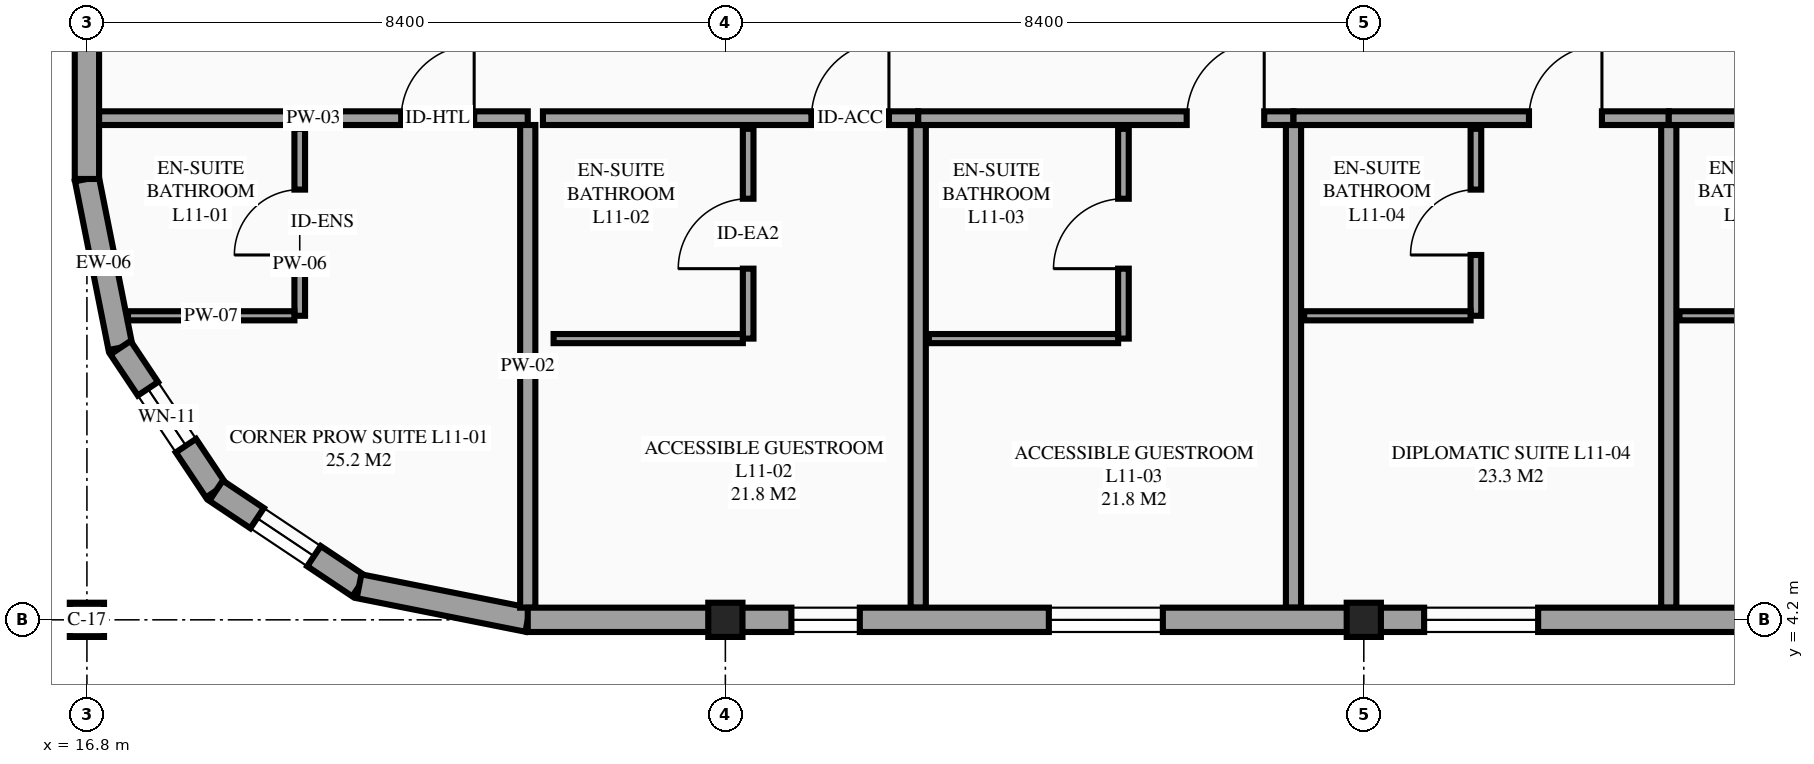
"""IFC4 building model, lengths in metres.
Left out: names, types, materials, properties, quantities, classifications, styles, units other than length and angle.
Written with IfcOpenShell. Run it as: python <this file> out.ifc"""

import sys

from ifc_helpers import new_model, si_unit, direction, frame, frame_2d, origin, origin_2d, place, context, subcontext, project, spatial, rectangle, extrude, element, fill, save


model = new_model("IFC4")
c1 = context("Model", 3, precision=1e-05, world=origin(), true_north=direction((0.0, 1.0)))
c2 = subcontext(c1, "Body", "Model", "MODEL_VIEW")
j1 = project(units=[si_unit("LENGTHUNIT", "METRE"), si_unit("PLANEANGLEUNIT", "RADIAN")], contexts=[c1])
p1 = place(None, origin())
s1 = spatial("IfcSite", under=j1, at=p1, CompositionType="ELEMENT")
p2 = place(p1, origin())
s2 = spatial("IfcBuilding", under=s1, at=p2, CompositionType="ELEMENT")
p3 = place(p2, frame((0.0, 0.0, 43.5)))
s3 = spatial("IfcBuildingStorey", under=s2, at=p3, CompositionType="ELEMENT", Elevation=43.5)
for number, where, z_axis, x_axis in (
    (1, (16.8, 4.2, 0.0), (0.0, 0.0, 1.0), (1.0, 0.0, 0.0)),
    (2, (25.2, 4.2, 0.0), (0.0, 0.0, 1.0), (1.0, 0.0, 0.0)),
    (3, (33.6, 4.2, 0.0), (0.0, 0.0, 1.0), (1.0, 0.0, 0.0)),
):
    element("IfcColumn", number, at=place(p3, frame(where, z_axis=z_axis, x_axis=x_axis)), inside=s3, PredefinedType="COLUMN", context=c2, shape_type="SweptSolid", body=[
        extrude(rectangle(XDim=0.45, YDim=0.45, at=origin_2d()), origin(), (0.0, 0.0, 1.0), 3.6),
    ])
p4 = place(p3, frame((16.8, 10.0, 0.0), z_axis=(0.0, 0.0, 1.0), x_axis=(0.195057908159, -0.980791727363, 0.0)))
e4 = element("IfcWall", 4, at=p4, inside=s3, PredefinedType="STANDARD", context=c2, shape_type="SweptSolid", body=[
    extrude(rectangle(XDim=2.263, YDim=0.32, at=frame_2d((1.131, 0.0))), origin(), (0.0, 0.0, 1.0), 2.56),
])
p5 = place(p3, frame((17.241, 7.781, 0.0), z_axis=(0.0, 0.0, 1.0), x_axis=(0.555546297918, -0.831485604728, 0.0)))
e5 = element("IfcWall", 5, at=p5, inside=s3, PredefinedType="STANDARD", context=c2, shape_type="SweptSolid", body=[
    extrude(rectangle(XDim=2.263, YDim=0.32, at=frame_2d((1.132, 0.0))), origin(), (0.0, 0.0, 1.0), 3.6),
])
p6 = place(p5, frame((0.65, 0.0, 0.75)))
e6 = element("IfcOpeningElement", 6, at=p6, cuts=e5, PredefinedType="OPENING", context=c2, shape_type="SweptSolid", body=[
    extrude(rectangle(XDim=0.9, YDim=1.55, at=frame_2d((0.45, 0.775))), frame((0.0, 0.17, 0.0), z_axis=(0.0, -1.0, 0.0), x_axis=(1.0, 0.0, 0.0)), (0.0, 0.0, 1.0), 0.34),
])
p7 = place(p3, frame((18.499, 5.899, 0.0), z_axis=(0.0, 0.0, 1.0), x_axis=(0.831502143458, -0.555521543618, 0.0)))
e7 = element("IfcWall", 7, at=p7, inside=s3, PredefinedType="STANDARD", context=c2, shape_type="SweptSolid", body=[
    extrude(rectangle(XDim=2.263, YDim=0.32, at=frame_2d((1.131, 0.0))), origin(), (0.0, 0.0, 1.0), 3.6),
])
p8 = place(p7, frame((0.65, 0.0, 0.75)))
e8 = element("IfcOpeningElement", 8, at=p8, cuts=e7, PredefinedType="OPENING", context=c2, shape_type="SweptSolid", body=[
    extrude(rectangle(XDim=0.9, YDim=1.55, at=frame_2d((0.45, 0.775))), frame((0.0, 0.17, 0.0), z_axis=(0.0, -1.0, 0.0), x_axis=(1.0, 0.0, 0.0)), (0.0, 0.0, 1.0), 0.34),
])
p9 = place(p3, frame((20.38, 4.642, 0.0), z_axis=(0.0, 0.0, 1.0), x_axis=(0.98077519094, -0.195141038321, 0.0)))
e9 = element("IfcWall", 9, at=p9, inside=s3, PredefinedType="STANDARD", context=c2, shape_type="SweptSolid", body=[
    extrude(rectangle(XDim=2.263, YDim=0.32, at=frame_2d((1.132, 0.0))), origin(), (0.0, 0.0, 1.0), 2.41),
])
p10 = place(p3, frame((16.8, 21.0, 0.0), z_axis=(0.0, 0.0, 1.0), x_axis=(0.0, -1.0, 0.0)))
e10 = element("IfcWall", 10, at=p10, inside=s3, PredefinedType="STANDARD", context=c2, shape_type="SweptSolid", body=[
    extrude(rectangle(XDim=11.0, YDim=0.32, at=frame_2d((5.5, 0.0))), origin(), (0.0, 0.0, 1.0), 2.51),
])
p11 = place(p3, frame((16.96, 10.8, 0.0), z_axis=(0.0, 0.0, 1.0), x_axis=(1.0, 0.0, 0.0)))
e11 = element("IfcWall", 11, at=p11, inside=s3, PredefinedType="PARTITIONING", context=c2, shape_type="SweptSolid", body=[
    extrude(rectangle(XDim=5.64, YDim=0.18, at=frame_2d((2.82, 0.0))), origin(), (0.0, 0.0, 1.0), 3.355),
])
p12 = place(p11, frame((3.975, 0.0, 0.0)))
e12 = element("IfcOpeningElement", 12, at=p12, cuts=e11, PredefinedType="OPENING", context=c2, shape_type="SweptSolid", body=[
    extrude(rectangle(XDim=0.96, YDim=2.15, at=frame_2d((0.48, 1.075))), frame((0.0, 0.1, 0.0), z_axis=(0.0, -1.0, 0.0), x_axis=(1.0, 0.0, 0.0)), (0.0, 0.0, 1.0), 0.2),
])
p13 = place(p3, frame((22.6, 4.36, 0.0), z_axis=(0.0, 0.0, 1.0), x_axis=(0.0, 1.0, 0.0)))
e13 = element("IfcWall", 13, at=p13, inside=s3, PredefinedType="PARTITIONING", context=c2, shape_type="SweptSolid", body=[
    extrude(rectangle(XDim=6.35, YDim=0.2, at=frame_2d((3.175, 0.0))), origin(), (0.0, 0.0, 1.0), 3.355),
])
p14 = place(p3, frame((19.6, 8.2, 0.0), z_axis=(0.0, 0.0, 1.0), x_axis=(0.0, 1.0, 0.0)))
e14 = element("IfcWall", 14, at=p14, inside=s3, PredefinedType="PARTITIONING", context=c2, shape_type="SweptSolid", body=[
    extrude(rectangle(XDim=2.46, YDim=0.14, at=frame_2d((1.23, 0.0))), origin(), (0.0, 0.0, 1.0), 3.355),
])
p15 = place(p14, frame((0.8, 0.0, 0.0)))
e15 = element("IfcOpeningElement", 15, at=p15, cuts=e14, PredefinedType="OPENING", context=c2, shape_type="SweptSolid", body=[
    extrude(rectangle(XDim=0.86, YDim=2.1, at=frame_2d((0.43, 1.05))), frame((0.0, 0.08, 0.0), z_axis=(0.0, -1.0, 0.0), x_axis=(1.0, 0.0, 0.0)), (0.0, 0.0, 1.0), 0.16),
])
p16 = place(p3, frame((17.34, 8.2, 0.0), z_axis=(0.0, 0.0, 1.0), x_axis=(1.0, 0.0, 0.0)))
e16 = element("IfcWall", 16, at=p16, inside=s3, PredefinedType="PARTITIONING", context=c2, shape_type="SweptSolid", body=[
    extrude(rectangle(XDim=2.19, YDim=0.12, at=frame_2d((1.095, 0.0))), origin(), (0.0, 0.0, 1.0), 3.355),
])
p17 = place(p3, frame((22.8, 10.8, 0.0), z_axis=(0.0, 0.0, 1.0), x_axis=(1.0, 0.0, 0.0)))
e17 = element("IfcWall", 17, at=p17, inside=s3, PredefinedType="PARTITIONING", context=c2, shape_type="SweptSolid", body=[
    extrude(rectangle(XDim=4.938, YDim=0.18, at=frame_2d((2.469, 0.0))), origin(), (0.0, 0.0, 1.0), 3.355),
])
p18 = place(p17, frame((3.532, 0.0, 0.0)))
e18 = element("IfcOpeningElement", 18, at=p18, cuts=e17, PredefinedType="OPENING", context=c2, shape_type="SweptSolid", body=[
    extrude(rectangle(XDim=1.02, YDim=2.15, at=frame_2d((0.51, 1.075))), frame((0.0, 0.1, 0.0), z_axis=(0.0, -1.0, 0.0), x_axis=(1.0, 0.0, 0.0)), (0.0, 0.0, 1.0), 0.2),
])
p19 = place(p3, frame((27.738, 4.36, 0.0), z_axis=(0.0, 0.0, 1.0), x_axis=(0.0, 1.0, 0.0)))
e19 = element("IfcWall", 19, at=p19, inside=s3, PredefinedType="PARTITIONING", context=c2, shape_type="SweptSolid", body=[
    extrude(rectangle(XDim=6.35, YDim=0.2, at=frame_2d((3.175, 0.0))), origin(), (0.0, 0.0, 1.0), 3.355),
])
p20 = place(p3, frame((25.5, 7.9, 0.0), z_axis=(0.0, 0.0, 1.0), x_axis=(0.0, 1.0, 0.0)))
e20 = element("IfcWall", 20, at=p20, inside=s3, PredefinedType="PARTITIONING", context=c2, shape_type="SweptSolid", body=[
    extrude(rectangle(XDim=2.76, YDim=0.14, at=frame_2d((1.38, 0.0))), origin(), (0.0, 0.0, 1.0), 3.355),
])
p21 = place(p20, frame((0.92, 0.0, 0.0)))
e21 = element("IfcOpeningElement", 21, at=p21, cuts=e20, PredefinedType="OPENING", context=c2, shape_type="SweptSolid", body=[
    extrude(rectangle(XDim=0.92, YDim=2.1, at=frame_2d((0.46, 1.05))), frame((0.0, 0.08, 0.0), z_axis=(0.0, -1.0, 0.0), x_axis=(1.0, 0.0, 0.0)), (0.0, 0.0, 1.0), 0.16),
])
p22 = place(p3, frame((22.94, 7.9, 0.0), z_axis=(0.0, 0.0, 1.0), x_axis=(1.0, 0.0, 0.0)))
e22 = element("IfcWall", 22, at=p22, inside=s3, PredefinedType="PARTITIONING", context=c2, shape_type="SweptSolid", body=[
    extrude(rectangle(XDim=2.49, YDim=0.12, at=frame_2d((1.245, 0.0))), origin(), (0.0, 0.0, 1.0), 3.355),
])
p23 = place(p3, frame((27.738, 10.8, 0.0), z_axis=(0.0, 0.0, 1.0), x_axis=(1.0, 0.0, 0.0)))
e23 = element("IfcWall", 23, at=p23, inside=s3, PredefinedType="PARTITIONING", context=c2, shape_type="SweptSolid", body=[
    extrude(rectangle(XDim=4.938, YDim=0.18, at=frame_2d((2.469, 0.0))), origin(), (0.0, 0.0, 1.0), 3.355),
])
p24 = place(p23, frame((3.532, 0.0, 0.0)))
e24 = element("IfcOpeningElement", 24, at=p24, cuts=e23, PredefinedType="OPENING", context=c2, shape_type="SweptSolid", body=[
    extrude(rectangle(XDim=1.02, YDim=2.15, at=frame_2d((0.51, 1.075))), frame((0.0, 0.1, 0.0), z_axis=(0.0, -1.0, 0.0), x_axis=(1.0, 0.0, 0.0)), (0.0, 0.0, 1.0), 0.2),
])
p25 = place(p3, frame((32.675, 4.36, 0.0), z_axis=(0.0, 0.0, 1.0), x_axis=(0.0, 1.0, 0.0)))
e25 = element("IfcWall", 25, at=p25, inside=s3, PredefinedType="PARTITIONING", context=c2, shape_type="SweptSolid", body=[
    extrude(rectangle(XDim=6.35, YDim=0.2, at=frame_2d((3.175, 0.0))), origin(), (0.0, 0.0, 1.0), 3.355),
])
p26 = place(p3, frame((30.438, 7.9, 0.0), z_axis=(0.0, 0.0, 1.0), x_axis=(0.0, 1.0, 0.0)))
e26 = element("IfcWall", 26, at=p26, inside=s3, PredefinedType="PARTITIONING", context=c2, shape_type="SweptSolid", body=[
    extrude(rectangle(XDim=2.76, YDim=0.14, at=frame_2d((1.38, 0.0))), origin(), (0.0, 0.0, 1.0), 3.355),
])
p27 = place(p26, frame((0.92, 0.0, 0.0)))
e27 = element("IfcOpeningElement", 27, at=p27, cuts=e26, PredefinedType="OPENING", context=c2, shape_type="SweptSolid", body=[
    extrude(rectangle(XDim=0.92, YDim=2.1, at=frame_2d((0.46, 1.05))), frame((0.0, 0.08, 0.0), z_axis=(0.0, -1.0, 0.0), x_axis=(1.0, 0.0, 0.0)), (0.0, 0.0, 1.0), 0.16),
])
p28 = place(p3, frame((27.877, 7.9, 0.0), z_axis=(0.0, 0.0, 1.0), x_axis=(1.0, 0.0, 0.0)))
e28 = element("IfcWall", 28, at=p28, inside=s3, PredefinedType="PARTITIONING", context=c2, shape_type="SweptSolid", body=[
    extrude(rectangle(XDim=2.49, YDim=0.12, at=frame_2d((1.245, 0.0))), origin(), (0.0, 0.0, 1.0), 3.355),
])
p29 = place(p3, frame((32.675, 10.8, 0.0), z_axis=(0.0, 0.0, 1.0), x_axis=(1.0, 0.0, 0.0)))
e29 = element("IfcWall", 29, at=p29, inside=s3, PredefinedType="PARTITIONING", context=c2, shape_type="SweptSolid", body=[
    extrude(rectangle(XDim=4.938, YDim=0.18, at=frame_2d((2.469, 0.0))), origin(), (0.0, 0.0, 1.0), 3.355),
])
p30 = place(p29, frame((3.098, 0.0, 0.0)))
e30 = element("IfcOpeningElement", 30, at=p30, cuts=e29, PredefinedType="OPENING", context=c2, shape_type="SweptSolid", body=[
    extrude(rectangle(XDim=0.96, YDim=2.15, at=frame_2d((0.48, 1.075))), frame((0.0, 0.1, 0.0), z_axis=(0.0, -1.0, 0.0), x_axis=(1.0, 0.0, 0.0)), (0.0, 0.0, 1.0), 0.2),
])
p31 = place(p3, frame((37.613, 4.36, 0.0), z_axis=(0.0, 0.0, 1.0), x_axis=(0.0, 1.0, 0.0)))
e31 = element("IfcWall", 31, at=p31, inside=s3, PredefinedType="PARTITIONING", context=c2, shape_type="SweptSolid", body=[
    extrude(rectangle(XDim=6.35, YDim=0.2, at=frame_2d((3.175, 0.0))), origin(), (0.0, 0.0, 1.0), 3.355),
])
p32 = place(p3, frame((35.075, 8.2, 0.0), z_axis=(0.0, 0.0, 1.0), x_axis=(0.0, 1.0, 0.0)))
e32 = element("IfcWall", 32, at=p32, inside=s3, PredefinedType="PARTITIONING", context=c2, shape_type="SweptSolid", body=[
    extrude(rectangle(XDim=2.46, YDim=0.14, at=frame_2d((1.23, 0.0))), origin(), (0.0, 0.0, 1.0), 3.355),
])
p33 = place(p32, frame((0.8, 0.0, 0.0)))
e33 = element("IfcOpeningElement", 33, at=p33, cuts=e32, PredefinedType="OPENING", context=c2, shape_type="SweptSolid", body=[
    extrude(rectangle(XDim=0.86, YDim=2.1, at=frame_2d((0.43, 1.05))), frame((0.0, 0.08, 0.0), z_axis=(0.0, -1.0, 0.0), x_axis=(1.0, 0.0, 0.0)), (0.0, 0.0, 1.0), 0.16),
])
p34 = place(p3, frame((32.815, 8.2, 0.0), z_axis=(0.0, 0.0, 1.0), x_axis=(1.0, 0.0, 0.0)))
e34 = element("IfcWall", 34, at=p34, inside=s3, PredefinedType="PARTITIONING", context=c2, shape_type="SweptSolid", body=[
    extrude(rectangle(XDim=2.19, YDim=0.12, at=frame_2d((1.095, 0.0))), origin(), (0.0, 0.0, 1.0), 3.355),
])
p35 = place(p3, frame((37.613, 10.8, 0.0), z_axis=(0.0, 0.0, 1.0), x_axis=(1.0, 0.0, 0.0)))
e35 = element("IfcWall", 35, at=p35, inside=s3, PredefinedType="PARTITIONING", context=c2, shape_type="SweptSolid", body=[
    extrude(rectangle(XDim=4.938, YDim=0.18, at=frame_2d((2.469, 0.0))), origin(), (0.0, 0.0, 1.0), 3.355),
])
p36 = place(p35, frame((2.748, 0.0, 0.0)))
e36 = element("IfcOpeningElement", 36, at=p36, cuts=e35, PredefinedType="OPENING", context=c2, shape_type="SweptSolid", body=[
    extrude(rectangle(XDim=0.96, YDim=2.15, at=frame_2d((0.48, 1.075))), frame((0.0, 0.1, 0.0), z_axis=(0.0, -1.0, 0.0), x_axis=(1.0, 0.0, 0.0)), (0.0, 0.0, 1.0), 0.2),
])
p37 = place(p3, frame((37.752, 8.2, 0.0), z_axis=(0.0, 0.0, 1.0), x_axis=(1.0, 0.0, 0.0)))
e37 = element("IfcWall", 37, at=p37, inside=s3, PredefinedType="PARTITIONING", context=c2, shape_type="SweptSolid", body=[
    extrude(rectangle(XDim=2.19, YDim=0.12, at=frame_2d((1.095, 0.0))), origin(), (0.0, 0.0, 1.0), 3.355),
])
p38 = place(p3, frame((22.6, 4.2, 0.0), z_axis=(0.0, 0.0, 1.0), x_axis=(1.0, 0.0, 0.0)))
e38 = element("IfcWall", 38, at=p38, inside=s3, PredefinedType="STANDARD", context=c2, shape_type="SweptSolid", body=[
    extrude(rectangle(XDim=2.6, YDim=0.32, at=frame_2d((1.3, 0.0))), origin(), (0.0, 0.0, 1.0), 2.41),
])
p39 = place(p3, frame((25.2, 4.2, 0.0), z_axis=(0.0, 0.0, 1.0), x_axis=(1.0, 0.0, 0.0)))
e39 = element("IfcWall", 39, at=p39, inside=s3, PredefinedType="STANDARD", context=c2, shape_type="SweptSolid", body=[
    extrude(rectangle(XDim=8.4, YDim=0.32, at=frame_2d((4.2, 0.0))), origin(), (0.0, 0.0, 1.0), 2.51),
])
p40 = place(p39, frame((0.869, 0.0, 0.85)))
e40 = element("IfcOpeningElement", 40, at=p40, cuts=e39, PredefinedType="OPENING", context=c2, shape_type="SweptSolid", body=[
    extrude(rectangle(XDim=0.9, YDim=1.5, at=frame_2d((0.45, 0.75))), frame((0.0, 0.17, 0.0), z_axis=(0.0, -1.0, 0.0), x_axis=(1.0, 0.0, 0.0)), (0.0, 0.0, 1.0), 0.34),
])
p41 = place(p39, frame((4.256, 0.0, 0.85)))
e41 = element("IfcOpeningElement", 41, at=p41, cuts=e39, PredefinedType="OPENING", context=c2, shape_type="SweptSolid", body=[
    extrude(rectangle(XDim=1.5, YDim=1.5, at=frame_2d((0.75, 0.75))), frame((0.0, 0.17, 0.0), z_axis=(0.0, -1.0, 0.0), x_axis=(1.0, 0.0, 0.0)), (0.0, 0.0, 1.0), 0.34),
])
p42 = place(p3, frame((33.6, 4.2, 0.0), z_axis=(0.0, 0.0, 1.0), x_axis=(1.0, 0.0, 0.0)))
e42 = element("IfcWall", 42, at=p42, inside=s3, PredefinedType="STANDARD", context=c2, shape_type="SweptSolid", body=[
    extrude(rectangle(XDim=8.4, YDim=0.32, at=frame_2d((4.2, 0.0))), origin(), (0.0, 0.0, 1.0), 3.113),
])
p43 = place(p42, frame((0.794, 0.0, 0.85)))
e43 = element("IfcOpeningElement", 43, at=p43, cuts=e42, PredefinedType="OPENING", context=c2, shape_type="SweptSolid", body=[
    extrude(rectangle(XDim=1.5, YDim=1.5, at=frame_2d((0.75, 0.75))), frame((0.0, 0.17, 0.0), z_axis=(0.0, -1.0, 0.0), x_axis=(1.0, 0.0, 0.0)), (0.0, 0.0, 1.0), 0.34),
])
p44 = place(p42, frame((5.731, 0.0, 0.85)))
e44 = element("IfcOpeningElement", 44, at=p44, cuts=e42, PredefinedType="OPENING", context=c2, shape_type="SweptSolid", body=[
    extrude(rectangle(XDim=1.5, YDim=1.5, at=frame_2d((0.75, 0.75))), frame((0.0, 0.17, 0.0), z_axis=(0.0, -1.0, 0.0), x_axis=(1.0, 0.0, 0.0)), (0.0, 0.0, 1.0), 0.34),
])
p45 = place(p6, origin())
e45 = element("IfcWindow", 45, at=p45, inside=s3, PartitioningType="SINGLE_PANEL", PredefinedType="WINDOW", context=c2, shape_type="SweptSolid", body=[
    extrude(rectangle(XDim=0.9, YDim=1.55, at=frame_2d((0.45, 0.775))), frame((0.0, 0.03, 0.0), z_axis=(0.0, -1.0, 0.0), x_axis=(1.0, 0.0, 0.0)), (0.0, 0.0, 1.0), 0.06),
])
fill(e6, e45)
p46 = place(p8, origin())
e46 = element("IfcWindow", 46, at=p46, inside=s3, PartitioningType="SINGLE_PANEL", PredefinedType="WINDOW", context=c2, shape_type="SweptSolid", body=[
    extrude(rectangle(XDim=0.9, YDim=1.55, at=frame_2d((0.45, 0.775))), frame((0.0, 0.03, 0.0), z_axis=(0.0, -1.0, 0.0), x_axis=(1.0, 0.0, 0.0)), (0.0, 0.0, 1.0), 0.06),
])
fill(e8, e46)
p47 = place(p40, origin())
e47 = element("IfcWindow", 47, at=p47, inside=s3, PartitioningType="SINGLE_PANEL", PredefinedType="WINDOW", context=c2, shape_type="SweptSolid", body=[
    extrude(rectangle(XDim=0.9, YDim=1.5, at=frame_2d((0.45, 0.75))), frame((0.0, 0.03, 0.0), z_axis=(0.0, -1.0, 0.0), x_axis=(1.0, 0.0, 0.0)), (0.0, 0.0, 1.0), 0.06),
])
fill(e40, e47)
p48 = place(p41, origin())
e48 = element("IfcWindow", 48, at=p48, inside=s3, PartitioningType="SINGLE_PANEL", PredefinedType="WINDOW", context=c2, shape_type="SweptSolid", body=[
    extrude(rectangle(XDim=1.5, YDim=1.5, at=frame_2d((0.75, 0.75))), frame((0.0, 0.03, 0.0), z_axis=(0.0, -1.0, 0.0), x_axis=(1.0, 0.0, 0.0)), (0.0, 0.0, 1.0), 0.06),
])
fill(e41, e48)
p49 = place(p43, origin())
e49 = element("IfcWindow", 49, at=p49, inside=s3, PartitioningType="SINGLE_PANEL", PredefinedType="WINDOW", context=c2, shape_type="SweptSolid", body=[
    extrude(rectangle(XDim=1.5, YDim=1.5, at=frame_2d((0.75, 0.75))), frame((0.0, 0.03, 0.0), z_axis=(0.0, -1.0, 0.0), x_axis=(1.0, 0.0, 0.0)), (0.0, 0.0, 1.0), 0.06),
])
fill(e43, e49)
p50 = place(p12, origin())
e50 = element("IfcDoor", 50, at=p50, inside=s3, OperationType="SINGLE_SWING_RIGHT", PredefinedType="DOOR", context=c2, shape_type="SweptSolid", body=[
    extrude(rectangle(XDim=0.96, YDim=2.15, at=frame_2d((0.48, 1.075))), frame((0.0, 0.025, 0.0), z_axis=(0.0, -1.0, 0.0), x_axis=(1.0, 0.0, 0.0)), (0.0, 0.0, 1.0), 0.05),
])
fill(e12, e50)
p51 = place(p15, origin())
e51 = element("IfcDoor", 51, at=p51, inside=s3, OperationType="SINGLE_SWING_LEFT", PredefinedType="DOOR", context=c2, shape_type="SweptSolid", body=[
    extrude(rectangle(XDim=0.86, YDim=2.1, at=frame_2d((0.43, 1.05))), frame((0.0, 0.025, 0.0), z_axis=(0.0, -1.0, 0.0), x_axis=(1.0, 0.0, 0.0)), (0.0, 0.0, 1.0), 0.05),
])
fill(e15, e51)
p52 = place(p18, origin())
e52 = element("IfcDoor", 52, at=p52, inside=s3, OperationType="SINGLE_SWING_RIGHT", PredefinedType="DOOR", context=c2, shape_type="SweptSolid", body=[
    extrude(rectangle(XDim=1.02, YDim=2.15, at=frame_2d((0.51, 1.075))), frame((0.0, 0.025, 0.0), z_axis=(0.0, -1.0, 0.0), x_axis=(1.0, 0.0, 0.0)), (0.0, 0.0, 1.0), 0.05),
])
fill(e18, e52)
p53 = place(p21, origin())
e53 = element("IfcDoor", 53, at=p53, inside=s3, OperationType="SINGLE_SWING_LEFT", PredefinedType="DOOR", context=c2, shape_type="SweptSolid", body=[
    extrude(rectangle(XDim=0.92, YDim=2.1, at=frame_2d((0.46, 1.05))), frame((0.0, 0.025, 0.0), z_axis=(0.0, -1.0, 0.0), x_axis=(1.0, 0.0, 0.0)), (0.0, 0.0, 1.0), 0.05),
])
fill(e21, e53)
p54 = place(p24, origin())
e54 = element("IfcDoor", 54, at=p54, inside=s3, OperationType="SINGLE_SWING_RIGHT", PredefinedType="DOOR", context=c2, shape_type="SweptSolid", body=[
    extrude(rectangle(XDim=1.02, YDim=2.15, at=frame_2d((0.51, 1.075))), frame((0.0, 0.025, 0.0), z_axis=(0.0, -1.0, 0.0), x_axis=(1.0, 0.0, 0.0)), (0.0, 0.0, 1.0), 0.05),
])
fill(e24, e54)
p55 = place(p27, origin())
e55 = element("IfcDoor", 55, at=p55, inside=s3, OperationType="SINGLE_SWING_LEFT", PredefinedType="DOOR", context=c2, shape_type="SweptSolid", body=[
    extrude(rectangle(XDim=0.92, YDim=2.1, at=frame_2d((0.46, 1.05))), frame((0.0, 0.025, 0.0), z_axis=(0.0, -1.0, 0.0), x_axis=(1.0, 0.0, 0.0)), (0.0, 0.0, 1.0), 0.05),
])
fill(e27, e55)
p56 = place(p30, origin())
e56 = element("IfcDoor", 56, at=p56, inside=s3, OperationType="SINGLE_SWING_RIGHT", PredefinedType="DOOR", context=c2, shape_type="SweptSolid", body=[
    extrude(rectangle(XDim=0.96, YDim=2.15, at=frame_2d((0.48, 1.075))), frame((0.0, 0.025, 0.0), z_axis=(0.0, -1.0, 0.0), x_axis=(1.0, 0.0, 0.0)), (0.0, 0.0, 1.0), 0.05),
])
fill(e30, e56)
p57 = place(p33, origin())
e57 = element("IfcDoor", 57, at=p57, inside=s3, OperationType="SINGLE_SWING_LEFT", PredefinedType="DOOR", context=c2, shape_type="SweptSolid", body=[
    extrude(rectangle(XDim=0.86, YDim=2.1, at=frame_2d((0.43, 1.05))), frame((0.0, 0.025, 0.0), z_axis=(0.0, -1.0, 0.0), x_axis=(1.0, 0.0, 0.0)), (0.0, 0.0, 1.0), 0.05),
])
fill(e33, e57)
save(model, sys.argv[1])
